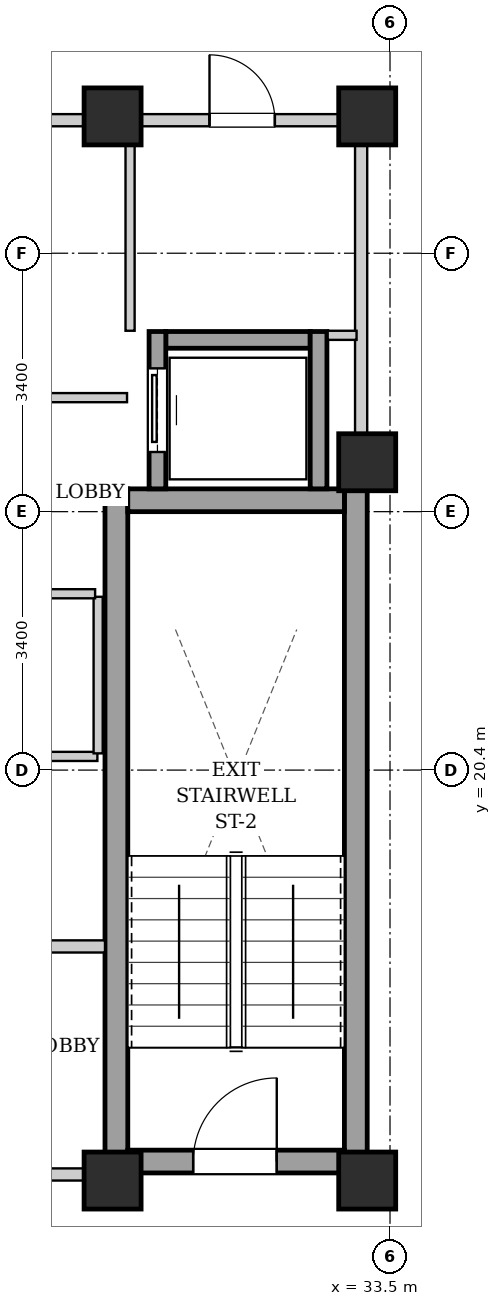
"""IFC4 building model, lengths in metres.
Left out: names, types, materials, properties, quantities, classifications, styles, units other than length and angle.
Written with IfcOpenShell. Run it as: python <this file> out.ifc"""

import sys

from ifc_helpers import new_model, si_unit, direction, frame, frame_2d, origin, origin_2d, place, context, subcontext, project, spatial, rectangle, extrude, element, fill, save


model = new_model("IFC4")
c1 = context("Model", 3, precision=1e-05, world=origin(), true_north=direction((0.0, 1.0)))
c2 = subcontext(c1, "Body", "Model", "MODEL_VIEW")
j1 = project(units=[si_unit("LENGTHUNIT", "METRE"), si_unit("PLANEANGLEUNIT", "RADIAN")], contexts=[c1])
p1 = place(None, origin())
s1 = spatial("IfcSite", under=j1, at=p1, CompositionType="ELEMENT")
p2 = place(p1, origin())
s2 = spatial("IfcBuilding", under=s1, at=p2, CompositionType="ELEMENT")
p3 = place(p2, frame((0.0, 0.0, 227.5)))
s3 = spatial("IfcBuildingStorey", under=s2, at=p3, CompositionType="ELEMENT", Elevation=227.5)
for number, where, z_axis, x_axis in (
    (1, (29.85, 15.0, 0.0), (0.0, 0.0, 1.0), (1.0, 0.0, 0.0)),
    (2, (33.2, 15.0, 0.0), (0.0, 0.0, 1.0), (1.0, 0.0, 0.0)),
    (3, (29.85, 29.0, 0.0), (0.0, 0.0, 1.0), (1.0, 0.0, 0.0)),
    (4, (33.2, 29.0, 0.0), (0.0, 0.0, 1.0), (1.0, 0.0, 0.0)),
    (5, (33.2, 24.45, 0.0), (0.0, 0.0, 1.0), (1.0, 0.0, 0.0)),
):
    element("IfcColumn", number, at=place(p3, frame(where, z_axis=z_axis, x_axis=x_axis)), inside=s3, PredefinedType="COLUMN", context=c2, shape_type="SweptSolid", body=[
        extrude(rectangle(XDim=0.75, YDim=0.75, at=origin_2d()), origin(), (0.0, 0.0, 1.0), 3.4),
    ])
for number, where, z_axis, x_axis in (
    (6, (29.9, 15.1, 0.0), (0.0, 0.0, 1.0), (0.0, 1.0, 0.0)),
    (7, (33.05, 15.1, 0.0), (0.0, 0.0, 1.0), (0.0, 1.0, 0.0)),
):
    element("IfcWall", number, at=place(p3, frame(where, z_axis=z_axis, x_axis=x_axis)), inside=s3, PredefinedType="SHEAR", context=c2, shape_type="SweptSolid", body=[
        extrude(rectangle(XDim=9.0, YDim=0.3, at=frame_2d((4.5, 0.0))), origin(), (0.0, 0.0, 1.0), 3.14),
    ])
p4 = place(p3, frame((30.05, 23.95, 0.0), z_axis=(0.0, 0.0, 1.0), x_axis=(1.0, 0.0, 0.0)))
e8 = element("IfcWall", 8, at=p4, inside=s3, PredefinedType="SHEAR", context=c2, shape_type="SweptSolid", body=[
    extrude(rectangle(XDim=2.85, YDim=0.3, at=frame_2d((1.425, 0.0))), origin(), (0.0, 0.0, 1.0), 3.14),
])
p5 = place(p3, frame((30.05, 15.25, 0.0), z_axis=(0.0, 0.0, 1.0), x_axis=(1.0, 0.0, 0.0)))
e9 = element("IfcWall", 9, at=p5, inside=s3, PredefinedType="SHEAR", context=c2, shape_type="SweptSolid", body=[
    extrude(rectangle(XDim=2.85, YDim=0.3, at=frame_2d((1.425, 0.0))), origin(), (0.0, 0.0, 1.0), 3.14),
])
p6 = place(p5, frame((0.86, 0.0, 0.0)))
e10 = element("IfcOpeningElement", 10, at=p6, cuts=e9, PredefinedType="OPENING", context=c2, shape_type="SweptSolid", body=[
    extrude(rectangle(XDim=1.1, YDim=2.05, at=frame_2d((0.55, 1.025))), frame((0.0, 0.16, 0.0), z_axis=(0.0, -1.0, 0.0), x_axis=(1.0, 0.0, 0.0)), (0.0, 0.0, 1.0), 0.32),
])
p7 = place(p3, frame((30.55, 26.06, 0.0), z_axis=(0.0, 0.0, 1.0), x_axis=(1.0, 0.0, 0.0)))
e11 = element("IfcWall", 11, at=p7, inside=s3, PredefinedType="SHEAR", context=c2, shape_type="SweptSolid", body=[
    extrude(rectangle(XDim=1.9, YDim=0.22, at=frame_2d((0.95, 0.0))), origin(), (0.0, 0.0, 1.0), 3.14),
])
p8 = place(p3, frame((30.44, 24.1, 0.0), z_axis=(0.0, 0.0, 1.0), x_axis=(0.0, 1.0, 0.0)))
e12 = element("IfcWall", 12, at=p8, inside=s3, PredefinedType="SHEAR", context=c2, shape_type="SweptSolid", body=[
    extrude(rectangle(XDim=2.07, YDim=0.22, at=frame_2d((1.035, 0.0))), origin(), (0.0, 0.0, 1.0), 3.14),
])
p9 = place(p8, frame((0.485, 0.0, 0.0)))
e13 = element("IfcOpeningElement", 13, at=p9, cuts=e12, PredefinedType="OPENING", context=c2, shape_type="SweptSolid", body=[
    extrude(rectangle(XDim=1.1, YDim=2.15, at=frame_2d((0.55, 1.075))), frame((0.0, 0.12, 0.0), z_axis=(0.0, -1.0, 0.0), x_axis=(1.0, 0.0, 0.0)), (0.0, 0.0, 1.0), 0.24),
])
p10 = place(p3, frame((32.56, 24.1, 0.0), z_axis=(0.0, 0.0, 1.0), x_axis=(0.0, 1.0, 0.0)))
e14 = element("IfcWall", 14, at=p10, inside=s3, PredefinedType="SHEAR", context=c2, shape_type="SweptSolid", body=[
    extrude(rectangle(XDim=2.07, YDim=0.22, at=frame_2d((1.035, 0.0))), origin(), (0.0, 0.0, 1.0), 3.14),
])
p11 = place(p3, frame((21.25, 15.08, 0.0), z_axis=(0.0, 0.0, 1.0), x_axis=(1.0, 0.0, 0.0)))
e15 = element("IfcWall", 15, at=p11, inside=s3, PredefinedType="PARTITIONING", context=c2, shape_type="SweptSolid", body=[
    extrude(rectangle(XDim=8.5, YDim=0.16, at=frame_2d((4.25, 0.0))), origin(), (0.0, 0.0, 1.0), 2.668),
])
p12 = place(p11, frame((3.725, 0.0, 0.0)))
e16 = element("IfcOpeningElement", 16, at=p12, cuts=e15, PredefinedType="OPENING", context=c2, shape_type="SweptSolid", body=[
    extrude(rectangle(XDim=1.05, YDim=2.05, at=frame_2d((0.525, 1.025))), frame((0.0, 0.09, 0.0), z_axis=(0.0, -1.0, 0.0), x_axis=(1.0, 0.0, 0.0)), (0.0, 0.0, 1.0), 0.18),
])
p13 = place(p3, frame((28.65, 18.08, 0.0), z_axis=(0.0, 0.0, 1.0), x_axis=(1.0, 0.0, 0.0)))
e17 = element("IfcWall", 17, at=p13, inside=s3, PredefinedType="PARTITIONING", context=c2, shape_type="SweptSolid", body=[
    extrude(rectangle(XDim=1.1, YDim=0.16, at=frame_2d((0.55, 0.0))), origin(), (0.0, 0.0, 1.0), 3.14),
])
p14 = place(p3, frame((33.12, 24.12, 0.0), z_axis=(0.0, 0.0, 1.0), x_axis=(0.0, 1.0, 0.0)))
e18 = element("IfcWall", 18, at=p14, inside=s3, PredefinedType="PARTITIONING", context=c2, shape_type="SweptSolid", body=[
    extrude(rectangle(XDim=4.76, YDim=0.16, at=frame_2d((2.38, 0.0))), origin(), (0.0, 0.0, 1.0), 2.475),
])
p15 = place(p3, frame((30.08, 26.18, 0.0), z_axis=(0.0, 0.0, 1.0), x_axis=(0.0, 1.0, 0.0)))
e19 = element("IfcWall", 19, at=p15, inside=s3, PredefinedType="PARTITIONING", context=c2, shape_type="SweptSolid", body=[
    extrude(rectangle(XDim=2.68, YDim=0.12, at=frame_2d((1.34, 0.0))), origin(), (0.0, 0.0, 1.0), 3.14),
])
p16 = place(p3, frame((32.68, 26.12, 0.0), z_axis=(0.0, 0.0, 1.0), x_axis=(1.0, 0.0, 0.0)))
e20 = element("IfcWall", 20, at=p16, inside=s3, PredefinedType="PARTITIONING", context=c2, shape_type="SweptSolid", body=[
    extrude(rectangle(XDim=0.38, YDim=0.12, at=frame_2d((0.19, 0.0))), origin(), (0.0, 0.0, 1.0), 3.14),
])
p17 = place(p3, frame((30.08, 28.95, 0.0), z_axis=(0.0, 0.0, 1.0), x_axis=(1.0, 0.0, 0.0)))
e21 = element("IfcWall", 21, at=p17, inside=s3, PredefinedType="PARTITIONING", context=c2, shape_type="SweptSolid", body=[
    extrude(rectangle(XDim=2.96, YDim=0.16, at=frame_2d((1.48, 0.0))), origin(), (0.0, 0.0, 1.0), 3.14),
])
p18 = place(p17, frame((1.045, 0.0, 0.0)))
e22 = element("IfcOpeningElement", 22, at=p18, cuts=e21, PredefinedType="OPENING", context=c2, shape_type="SweptSolid", body=[
    extrude(rectangle(XDim=0.86, YDim=2.05, at=frame_2d((0.43, 1.025))), frame((0.0, 0.09, 0.0), z_axis=(0.0, -1.0, 0.0), x_axis=(1.0, 0.0, 0.0)), (0.0, 0.0, 1.0), 0.18),
])
p19 = place(p3, frame((25.72, 28.95, 0.0), z_axis=(0.0, 0.0, 1.0), x_axis=(1.0, 0.0, 0.0)))
e23 = element("IfcWall", 23, at=p19, inside=s3, PredefinedType="PARTITIONING", context=c2, shape_type="SweptSolid", body=[
    extrude(rectangle(XDim=4.32, YDim=0.16, at=frame_2d((2.16, 0.0))), origin(), (0.0, 0.0, 1.0), 2.668),
])
p20 = place(p3, frame((25.72, 25.3, 0.0), z_axis=(0.0, 0.0, 1.0), x_axis=(1.0, 0.0, 0.0)))
e24 = element("IfcWall", 24, at=p20, inside=s3, PredefinedType="PARTITIONING", context=c2, shape_type="SweptSolid", body=[
    extrude(rectangle(XDim=4.32, YDim=0.12, at=frame_2d((2.16, 0.0))), origin(), (0.0, 0.0, 1.0), 3.14),
])
p21 = place(p20, frame((1.65, 0.0, 0.0)))
e25 = element("IfcOpeningElement", 25, at=p21, cuts=e24, PredefinedType="OPENING", context=c2, shape_type="SweptSolid", body=[
    extrude(rectangle(XDim=0.9, YDim=2.05, at=frame_2d((0.45, 1.025))), frame((0.0, 0.07, 0.0), z_axis=(0.0, -1.0, 0.0), x_axis=(1.0, 0.0, 0.0)), (0.0, 0.0, 1.0), 0.14),
])
p22 = place(p3, frame((22.3, 20.58, 0.0), z_axis=(0.0, 0.0, 1.0), x_axis=(1.0, 0.0, 0.0)))
e26 = element("IfcWall", 26, at=p22, inside=s3, PredefinedType="PARTITIONING", context=c2, shape_type="SweptSolid", body=[
    extrude(rectangle(XDim=7.35, YDim=0.12, at=frame_2d((3.675, 0.0))), origin(), (0.0, 0.0, 1.0), 3.14),
])
p23 = place(p3, frame((29.66, 20.62, 0.0), z_axis=(0.0, 0.0, 1.0), x_axis=(0.0, 1.0, 0.0)))
e27 = element("IfcWall", 27, at=p23, inside=s3, PredefinedType="PARTITIONING", context=c2, shape_type="SweptSolid", body=[
    extrude(rectangle(XDim=2.06, YDim=0.12, at=frame_2d((1.03, 0.0))), origin(), (0.0, 0.0, 1.0), 3.14),
])
p24 = place(p3, frame((22.35, 22.72, 0.0), z_axis=(0.0, 0.0, 1.0), x_axis=(1.0, 0.0, 0.0)))
e28 = element("IfcWall", 28, at=p24, inside=s3, PredefinedType="PARTITIONING", context=c2, shape_type="SweptSolid", body=[
    extrude(rectangle(XDim=7.27, YDim=0.12, at=frame_2d((3.635, 0.0))), origin(), (0.0, 0.0, 1.0), 3.14),
])
p25 = place(p24, frame((3.25, 0.0, 0.0)))
e29 = element("IfcOpeningElement", 29, at=p25, cuts=e28, PredefinedType="OPENING", context=c2, shape_type="SweptSolid", body=[
    extrude(rectangle(XDim=0.9, YDim=2.05, at=frame_2d((0.45, 1.025))), frame((0.0, 0.07, 0.0), z_axis=(0.0, -1.0, 0.0), x_axis=(1.0, 0.0, 0.0)), (0.0, 0.0, 1.0), 0.14),
])
p26 = place(p6, origin())
e30 = element("IfcDoor", 30, at=p26, inside=s3, OperationType="SINGLE_SWING_RIGHT", PredefinedType="DOOR", context=c2, shape_type="SweptSolid", body=[
    extrude(rectangle(XDim=1.1, YDim=2.05, at=frame_2d((0.55, 1.025))), frame((0.0, 0.025, 0.0), z_axis=(0.0, -1.0, 0.0), x_axis=(1.0, 0.0, 0.0)), (0.0, 0.0, 1.0), 0.05),
])
fill(e10, e30)
p27 = place(p9, origin())
e31 = element("IfcDoor", 31, at=p27, inside=s3, OperationType="SLIDING_TO_LEFT", PredefinedType="DOOR", context=c2, shape_type="SweptSolid", body=[
    extrude(rectangle(XDim=1.1, YDim=2.15, at=frame_2d((0.55, 1.075))), frame((0.0, 0.025, 0.0), z_axis=(0.0, -1.0, 0.0), x_axis=(1.0, 0.0, 0.0)), (0.0, 0.0, 1.0), 0.05),
])
fill(e13, e31)
p28 = place(p18, origin())
e32 = element("IfcDoor", 32, at=p28, inside=s3, OperationType="SINGLE_SWING_LEFT", PredefinedType="DOOR", context=c2, shape_type="SweptSolid", body=[
    extrude(rectangle(XDim=0.86, YDim=2.05, at=frame_2d((0.43, 1.025))), frame((0.0, 0.025, 0.0), z_axis=(0.0, -1.0, 0.0), x_axis=(1.0, 0.0, 0.0)), (0.0, 0.0, 1.0), 0.05),
])
fill(e22, e32)
save(model, sys.argv[1])
